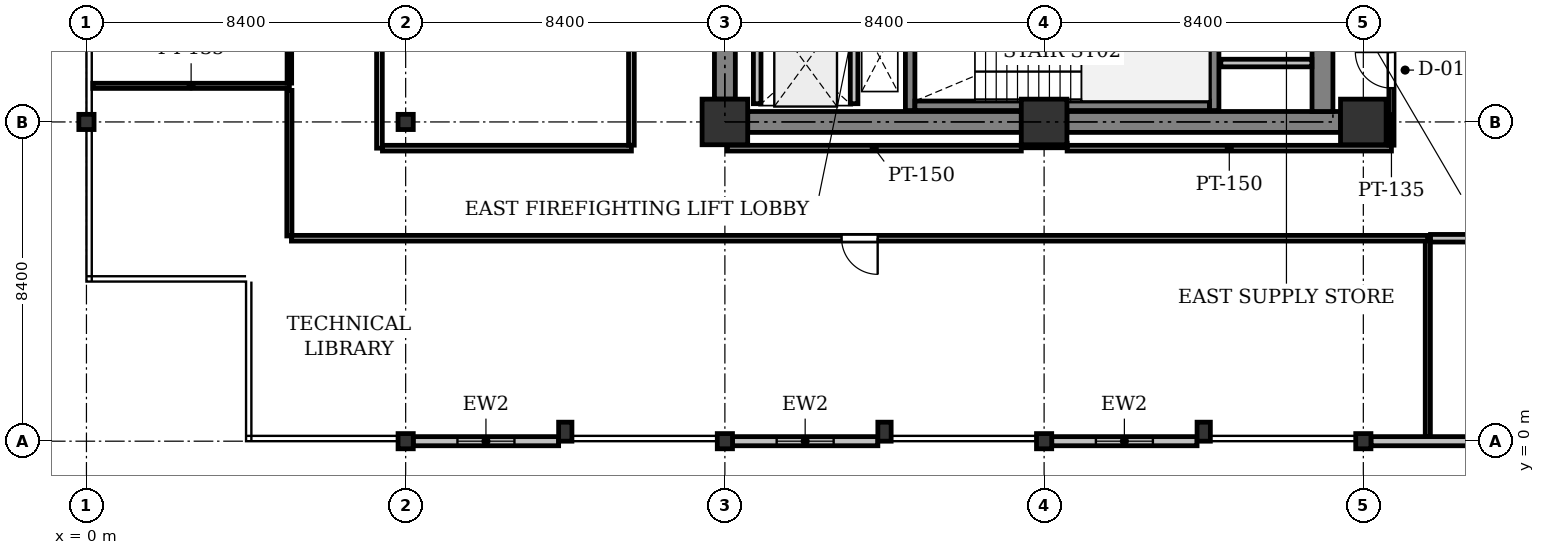
"""IFC4 building model, lengths in metres.
Left out: names, types, materials, properties, quantities, classifications, styles, units other than length and angle.
Written with IfcOpenShell. Run it as: python <this file> out.ifc"""

import sys

from ifc_helpers import new_model, si_unit, direction, frame, frame_2d, origin, origin_2d, place, context, subcontext, project, spatial, rectangle, i_section, extrude, element, fill, save


model = new_model("IFC4")
c1 = context("Model", 3, precision=1e-05, world=origin(), true_north=direction((0.0, 1.0)))
c2 = subcontext(c1, "Body", "Model", "MODEL_VIEW")
j1 = project(units=[si_unit("LENGTHUNIT", "METRE"), si_unit("PLANEANGLEUNIT", "RADIAN")], contexts=[c1])
p1 = place(None, origin())
s1 = spatial("IfcSite", under=j1, at=p1, CompositionType="ELEMENT")
p2 = place(p1, origin())
s2 = spatial("IfcBuilding", under=s1, at=p2, CompositionType="ELEMENT")
p3 = place(p2, frame((0.0, 0.0, 109.0)))
s3 = spatial("IfcBuildingStorey", under=s2, at=p3, CompositionType="ELEMENT", Elevation=109.0)
for number, where, z_axis, x_axis in (
    (1, (0.0, 8.4, 0.0), (0.0, 0.0, 1.0), (1.0, 0.0, 0.0)),
    (2, (8.4, 0.0, 0.0), (0.0, 0.0, 1.0), (1.0, 0.0, 0.0)),
    (3, (8.4, 8.4, 0.0), (0.0, 0.0, 1.0), (1.0, 0.0, 0.0)),
    (4, (16.8, 0.0, 0.0), (0.0, 0.0, 1.0), (1.0, 0.0, 0.0)),
):
    element("IfcColumn", number, at=place(p3, frame(where, z_axis=z_axis, x_axis=x_axis)), inside=s3, PredefinedType="COLUMN", context=c2, shape_type="SweptSolid", body=[
        extrude(i_section(OverallWidth=0.4, OverallDepth=0.4, WebThickness=0.025, FlangeThickness=0.04, at=origin_2d()), origin(), (0.0, 0.0, 1.0), 4.1),
    ])
p4 = place(p3, frame((16.8, 8.4, 0.0), z_axis=(0.0, 0.0, 1.0), x_axis=(1.0, 0.0, 0.0)))
e5 = element("IfcColumn", 5, at=p4, inside=s3, PredefinedType="COLUMN", context=c2, shape_type="SweptSolid", body=[
    extrude(rectangle(XDim=1.2, YDim=1.2, at=origin_2d()), origin(), (0.0, 0.0, 1.0), 4.1),
])
p5 = place(p3, frame((25.2, 0.0, 0.0), z_axis=(0.0, 0.0, 1.0), x_axis=(1.0, 0.0, 0.0)))
e6 = element("IfcColumn", 6, at=p5, inside=s3, PredefinedType="COLUMN", context=c2, shape_type="SweptSolid", body=[
    extrude(i_section(OverallWidth=0.4, OverallDepth=0.4, WebThickness=0.025, FlangeThickness=0.04, at=origin_2d()), origin(), (0.0, 0.0, 1.0), 4.1),
])
p6 = place(p3, frame((25.2, 8.4, 0.0), z_axis=(0.0, 0.0, 1.0), x_axis=(1.0, 0.0, 0.0)))
e7 = element("IfcColumn", 7, at=p6, inside=s3, PredefinedType="COLUMN", context=c2, shape_type="SweptSolid", body=[
    extrude(rectangle(XDim=1.2, YDim=1.2, at=origin_2d()), origin(), (0.0, 0.0, 1.0), 4.1),
])
p7 = place(p3, frame((33.6, 0.0, 0.0), z_axis=(0.0, 0.0, 1.0), x_axis=(1.0, 0.0, 0.0)))
e8 = element("IfcColumn", 8, at=p7, inside=s3, PredefinedType="COLUMN", context=c2, shape_type="SweptSolid", body=[
    extrude(i_section(OverallWidth=0.4, OverallDepth=0.4, WebThickness=0.025, FlangeThickness=0.04, at=origin_2d()), origin(), (0.0, 0.0, 1.0), 4.1),
])
p8 = place(p3, frame((33.6, 8.4, 0.0), z_axis=(0.0, 0.0, 1.0), x_axis=(1.0, 0.0, 0.0)))
e9 = element("IfcColumn", 9, at=p8, inside=s3, PredefinedType="COLUMN", context=c2, shape_type="SweptSolid", body=[
    extrude(rectangle(XDim=1.2, YDim=1.2, at=origin_2d()), origin(), (0.0, 0.0, 1.0), 4.1),
])
for number, where, z_axis, x_axis in (
    (10, (12.6, 0.25, 0.0), (0.0, 0.0, 1.0), (1.0, 0.0, 0.0)),
    (11, (21.0, 0.25, 0.0), (0.0, 0.0, 1.0), (1.0, 0.0, 0.0)),
    (12, (29.4, 0.25, 0.0), (0.0, 0.0, 1.0), (1.0, 0.0, 0.0)),
):
    element("IfcColumn", number, at=place(p3, frame(where, z_axis=z_axis, x_axis=x_axis)), inside=s3, PredefinedType="PILASTER", context=c2, shape_type="SweptSolid", body=[
        extrude(rectangle(XDim=0.35, YDim=0.5, at=origin_2d()), origin(), (0.0, 0.0, 1.0), 4.1),
    ])
p9 = place(p3, frame((41.8, 0.0, 0.0), z_axis=(0.0, 0.0, 1.0), x_axis=(-1.0, 0.0, 0.0)))
e13 = element("IfcWall", 13, at=p9, inside=s3, PredefinedType="STANDARD", context=c2, shape_type="SweptSolid", body=[
    extrude(rectangle(XDim=8.0, YDim=0.24, at=frame_2d((4.0, 0.0))), origin(), (0.0, 0.0, 1.0), 3.75),
])
p10 = place(p9, frame((2.537, 0.0, 0.9)))
e14 = element("IfcOpeningElement", 14, at=p10, cuts=e13, PredefinedType="OPENING", context=c2, shape_type="SweptSolid", body=[
    extrude(rectangle(XDim=1.5, YDim=1.6, at=frame_2d((0.75, 0.8))), frame((0.0, 0.13, 0.0), z_axis=(0.0, -1.0, 0.0), x_axis=(1.0, 0.0, 0.0)), (0.0, 0.0, 1.0), 0.26),
])
p11 = place(p3, frame((29.225, 0.0, 0.0), z_axis=(0.0, 0.0, 1.0), x_axis=(-1.0, 0.0, 0.0)))
e15 = element("IfcWall", 15, at=p11, inside=s3, PredefinedType="STANDARD", context=c2, shape_type="SweptSolid", body=[
    extrude(rectangle(XDim=3.825, YDim=0.24, at=frame_2d((1.913, 0.0))), origin(), (0.0, 0.0, 1.0), 3.347),
])
p12 = place(p11, frame((1.163, 0.0, 0.9)))
e16 = element("IfcOpeningElement", 16, at=p12, cuts=e15, PredefinedType="OPENING", context=c2, shape_type="SweptSolid", body=[
    extrude(rectangle(XDim=1.5, YDim=1.6, at=frame_2d((0.75, 0.8))), frame((0.0, 0.13, 0.0), z_axis=(0.0, -1.0, 0.0), x_axis=(1.0, 0.0, 0.0)), (0.0, 0.0, 1.0), 0.26),
])
p13 = place(p3, frame((20.825, 0.0, 0.0), z_axis=(0.0, 0.0, 1.0), x_axis=(-1.0, 0.0, 0.0)))
e17 = element("IfcWall", 17, at=p13, inside=s3, PredefinedType="STANDARD", context=c2, shape_type="SweptSolid", body=[
    extrude(rectangle(XDim=3.825, YDim=0.24, at=frame_2d((1.913, 0.0))), origin(), (0.0, 0.0, 1.0), 3.347),
])
p14 = place(p13, frame((1.163, 0.0, 0.9)))
e18 = element("IfcOpeningElement", 18, at=p14, cuts=e17, PredefinedType="OPENING", context=c2, shape_type="SweptSolid", body=[
    extrude(rectangle(XDim=1.5, YDim=1.6, at=frame_2d((0.75, 0.8))), frame((0.0, 0.13, 0.0), z_axis=(0.0, -1.0, 0.0), x_axis=(1.0, 0.0, 0.0)), (0.0, 0.0, 1.0), 0.26),
])
p15 = place(p3, frame((12.425, 0.0, 0.0), z_axis=(0.0, 0.0, 1.0), x_axis=(-1.0, 0.0, 0.0)))
e19 = element("IfcWall", 19, at=p15, inside=s3, PredefinedType="STANDARD", context=c2, shape_type="SweptSolid", body=[
    extrude(rectangle(XDim=3.825, YDim=0.24, at=frame_2d((1.913, 0.0))), origin(), (0.0, 0.0, 1.0), 3.347),
])
p16 = place(p15, frame((1.163, 0.0, 0.9)))
e20 = element("IfcOpeningElement", 20, at=p16, cuts=e19, PredefinedType="OPENING", context=c2, shape_type="SweptSolid", body=[
    extrude(rectangle(XDim=1.5, YDim=1.6, at=frame_2d((0.75, 0.8))), frame((0.0, 0.13, 0.0), z_axis=(0.0, -1.0, 0.0), x_axis=(1.0, 0.0, 0.0)), (0.0, 0.0, 1.0), 0.26),
])
p17 = place(p3, frame((17.4, 8.4, 0.0), z_axis=(0.0, 0.0, 1.0), x_axis=(1.0, 0.0, 0.0)))
e21 = element("IfcWall", 21, at=p17, inside=s3, PredefinedType="SHEAR", context=c2, shape_type="SweptSolid", body=[
    extrude(rectangle(XDim=7.2, YDim=0.55, at=frame_2d((3.6, 0.0))), origin(), (0.0, 0.0, 1.0), 3.75),
])
p18 = place(p3, frame((25.8, 8.4, 0.0), z_axis=(0.0, 0.0, 1.0), x_axis=(1.0, 0.0, 0.0)))
e22 = element("IfcWall", 22, at=p18, inside=s3, PredefinedType="SHEAR", context=c2, shape_type="SweptSolid", body=[
    extrude(rectangle(XDim=7.2, YDim=0.55, at=frame_2d((3.6, 0.0))), origin(), (0.0, 0.0, 1.0), 3.75),
])
p19 = place(p3, frame((32.525, 8.675, 0.0), z_axis=(0.0, 0.0, 1.0), x_axis=(0.0, 1.0, 0.0)))
e23 = element("IfcWall", 23, at=p19, inside=s3, PredefinedType="SHEAR", context=c2, shape_type="SweptSolid", body=[
    extrude(rectangle(XDim=7.85, YDim=0.55, at=frame_2d((3.925, 0.0))), origin(), (0.0, 0.0, 1.0), 3.75),
])
p20 = place(p19, frame((4.025, 0.0, 0.0)))
e24 = element("IfcOpeningElement", 24, at=p20, cuts=e23, PredefinedType="OPENING", context=c2, shape_type="SweptSolid", body=[
    extrude(rectangle(XDim=1.1, YDim=2.15, at=frame_2d((0.55, 1.075))), frame((0.0, 0.285, 0.0), z_axis=(0.0, -1.0, 0.0), x_axis=(1.0, 0.0, 0.0)), (0.0, 0.0, 1.0), 0.57),
])
p21 = place(p3, frame((16.8, 9.0, 0.0), z_axis=(0.0, 0.0, 1.0), x_axis=(0.0, 1.0, 0.0)))
e25 = element("IfcWall", 25, at=p21, inside=s3, PredefinedType="SHEAR", context=c2, shape_type="SweptSolid", body=[
    extrude(rectangle(XDim=7.2, YDim=0.55, at=frame_2d((3.6, 0.0))), origin(), (0.0, 0.0, 1.0), 3.75),
])
p22 = place(p21, frame((3.25, 0.0, 0.0)))
e26 = element("IfcOpeningElement", 26, at=p22, cuts=e25, PredefinedType="OPENING", context=c2, shape_type="SweptSolid", body=[
    extrude(rectangle(XDim=1.1, YDim=2.15, at=frame_2d((0.55, 1.075))), frame((0.0, 0.285, 0.0), z_axis=(0.0, -1.0, 0.0), x_axis=(1.0, 0.0, 0.0)), (0.0, 0.0, 1.0), 0.57),
])
for number, where, z_axis, x_axis in (
    (27, (21.675, 8.7, 0.0), (0.0, 0.0, 1.0), (0.0, 1.0, 0.0)),
    (28, (29.675, 8.7, 0.0), (0.0, 0.0, 1.0), (0.0, 1.0, 0.0)),
):
    element("IfcWall", number, at=place(p3, frame(where, z_axis=z_axis, x_axis=x_axis)), inside=s3, PredefinedType="SHEAR", context=c2, shape_type="SweptSolid", body=[
        extrude(rectangle(XDim=3.75, YDim=0.25, at=frame_2d((1.875, 0.0))), origin(), (0.0, 0.0, 1.0), 3.75),
    ])
p23 = place(p3, frame((21.8, 8.825, 0.0), z_axis=(0.0, 0.0, 1.0), x_axis=(1.0, 0.0, 0.0)))
e29 = element("IfcWall", 29, at=p23, inside=s3, PredefinedType="SHEAR", context=c2, shape_type="SweptSolid", body=[
    extrude(rectangle(XDim=7.75, YDim=0.25, at=frame_2d((3.875, 0.0))), origin(), (0.0, 0.0, 1.0), 3.75),
])
for number, where, z_axis, x_axis in (
    (30, (20.2, 8.88, 0.0), (0.0, 0.0, 1.0), (0.0, 1.0, 0.0)),
    (31, (17.65, 8.88, 0.0), (0.0, 0.0, 1.0), (0.0, 1.0, 0.0)),
):
    element("IfcWall", number, at=place(p3, frame(where, z_axis=z_axis, x_axis=x_axis)), inside=s3, PredefinedType="PARTITIONING", context=c2, shape_type="SweptSolid", body=[
        extrude(rectangle(XDim=2.1, YDim=0.2, at=frame_2d((1.05, 0.0))), origin(), (0.0, 0.0, 1.0), 3.75),
    ])
p24 = place(p3, frame((29.85, 9.95, 0.0), z_axis=(0.0, 0.0, 1.0), x_axis=(1.0, 0.0, 0.0)))
e32 = element("IfcWall", 32, at=p24, inside=s3, PredefinedType="PARTITIONING", context=c2, shape_type="SweptSolid", body=[
    extrude(rectangle(XDim=2.396, YDim=0.2, at=frame_2d((1.198, 0.0))), origin(), (0.0, 0.0, 1.0), 3.75),
])
p25 = place(p3, frame((0.169, 9.35, 0.0), z_axis=(0.0, 0.0, 1.0), x_axis=(1.0, 0.0, 0.0)))
e33 = element("IfcWall", 33, at=p25, inside=s3, PredefinedType="PARTITIONING", context=c2, shape_type="SweptSolid", body=[
    extrude(rectangle(XDim=5.171, YDim=0.135, at=frame_2d((2.585, 0.0))), origin(), (0.0, 0.0, 1.0), 3.394),
])
p26 = place(p3, frame((5.34, 9.421, 0.0), z_axis=(0.0, 0.0, 1.0), x_axis=(0.0, 1.0, 0.0)))
e34 = element("IfcWall", 34, at=p26, inside=s3, PredefinedType="PARTITIONING", context=c2, shape_type="SweptSolid", body=[
    extrude(rectangle(XDim=2.957, YDim=0.12, at=frame_2d((1.479, 0.0))), origin(), (0.0, 0.0, 1.0), 3.75),
])
p27 = place(p26, frame((1.019, 0.0, 0.0)))
e35 = element("IfcOpeningElement", 35, at=p27, cuts=e34, PredefinedType="OPENING", context=c2, shape_type="SweptSolid", body=[
    extrude(rectangle(XDim=0.92, YDim=2.1, at=frame_2d((0.46, 1.05))), frame((0.0, 0.07, 0.0), z_axis=(0.0, -1.0, 0.0), x_axis=(1.0, 0.0, 0.0)), (0.0, 0.0, 1.0), 0.14),
])
p28 = place(p3, frame((25.806, 7.781, 0.0), z_axis=(0.0, 0.0, 1.0), x_axis=(-0.999999672047, -0.000809880277, 0.0)))
e36 = element("IfcWall", 36, at=p28, inside=s3, PredefinedType="PARTITIONING", context=c2, shape_type="SweptSolid", body=[
    extrude(rectangle(XDim=1.206, YDim=0.12, at=frame_2d((0.603, 0.0))), origin(), (0.0, 0.0, 1.0), 3.222),
])
p29 = place(p3, frame((16.86, 7.71, 0.0), z_axis=(0.0, 0.0, 1.0), x_axis=(1.0, 0.0, 0.0)))
e37 = element("IfcWall", 37, at=p29, inside=s3, PredefinedType="PARTITIONING", context=c2, shape_type="SweptSolid", body=[
    extrude(rectangle(XDim=7.74, YDim=0.15, at=frame_2d((3.87, 0.0))), origin(), (0.0, 0.0, 1.0), 3.222),
])
p30 = place(p3, frame((25.806, 7.71, 0.0), z_axis=(0.0, 0.0, 1.0), x_axis=(1.0, 0.0, 0.0)))
e38 = element("IfcWall", 38, at=p30, inside=s3, PredefinedType="PARTITIONING", context=c2, shape_type="SweptSolid", body=[
    extrude(rectangle(XDim=8.534, YDim=0.15, at=frame_2d((4.267, 0.0))), origin(), (0.0, 0.0, 1.0), 3.222),
])
p31 = place(p3, frame((34.34, 7.789, 0.0), z_axis=(0.0, 0.0, 1.0), x_axis=(0.0, 1.0, 0.0)))
e39 = element("IfcWall", 39, at=p31, inside=s3, PredefinedType="PARTITIONING", context=c2, shape_type="SweptSolid", body=[
    extrude(rectangle(XDim=3.951, YDim=0.135, at=frame_2d((1.976, 0.0))), origin(), (0.0, 0.0, 1.0), 3.217),
])
p32 = place(p31, frame((1.5, 0.0, 0.0)))
e40 = element("IfcOpeningElement", 40, at=p32, cuts=e39, PredefinedType="OPENING", context=c2, shape_type="SweptSolid", body=[
    extrude(rectangle(XDim=0.95, YDim=2.15, at=frame_2d((0.475, 1.075))), frame((0.0, 0.077, 0.0), z_axis=(0.0, -1.0, 0.0), x_axis=(1.0, 0.0, 0.0)), (0.0, 0.0, 1.0), 0.155),
])
p33 = place(p3, frame((35.297, 0.124, 0.0), z_axis=(0.0, 0.0, 1.0), x_axis=(0.0, 1.0, 0.0)))
e41 = element("IfcWall", 41, at=p33, inside=s3, PredefinedType="PARTITIONING", context=c2, shape_type="SweptSolid", body=[
    extrude(rectangle(XDim=5.216, YDim=0.135, at=frame_2d((2.608, 0.0))), origin(), (0.0, 0.0, 1.0), 3.75),
])
p34 = place(p3, frame((35.297, 5.34, 0.0), z_axis=(0.0, 0.0, 1.0), x_axis=(-0.999999999967, 8.164398e-06, 0.0)))
e42 = element("IfcWall", 42, at=p34, inside=s3, PredefinedType="PARTITIONING", context=c2, shape_type="SweptSolid", body=[
    extrude(rectangle(XDim=29.903, YDim=0.15, at=frame_2d((14.952, 0.0))), origin(), (0.0, 0.0, 1.0), 3.222),
])
p35 = place(p34, frame((14.477, 0.0, 0.0)))
e43 = element("IfcOpeningElement", 43, at=p35, cuts=e42, PredefinedType="OPENING", context=c2, shape_type="SweptSolid", body=[
    extrude(rectangle(XDim=0.95, YDim=2.15, at=frame_2d((0.475, 1.075))), frame((0.0, 0.085, 0.0), z_axis=(0.0, -1.0, 0.0), x_axis=(1.0, 0.0, 0.0)), (0.0, 0.0, 1.0), 0.17),
])
p36 = place(p3, frame((5.34, 5.4, 0.0), z_axis=(0.0, 0.0, 1.0), x_axis=(0.0, 1.0, 0.0)))
e44 = element("IfcWall", 44, at=p36, inside=s3, PredefinedType="PARTITIONING", context=c2, shape_type="SweptSolid", body=[
    extrude(rectangle(XDim=3.83, YDim=0.135, at=frame_2d((1.915, 0.0))), origin(), (0.0, 0.0, 1.0), 3.217),
])
p37 = place(p3, frame((7.71, 22.711, 0.0), z_axis=(0.0, 0.0, 1.0), x_axis=(0.0, -1.0, 0.0)))
e45 = element("IfcWall", 45, at=p37, inside=s3, PredefinedType="PARTITIONING", context=c2, shape_type="SweptSolid", body=[
    extrude(rectangle(XDim=15.001, YDim=0.15, at=frame_2d((7.5, 0.0))), origin(), (0.0, 0.0, 1.0), 3.217),
])
p38 = place(p3, frame((7.789, 7.71, 0.0), z_axis=(0.0, 0.0, 1.0), x_axis=(1.0, 0.0, 0.0)))
e46 = element("IfcWall", 46, at=p38, inside=s3, PredefinedType="PARTITIONING", context=c2, shape_type="SweptSolid", body=[
    extrude(rectangle(XDim=6.551, YDim=0.15, at=frame_2d((3.275, 0.0))), origin(), (0.0, 0.0, 1.0), 3.222),
])
p39 = place(p3, frame((14.34, 7.789, 0.0), z_axis=(0.0, 0.0, 1.0), x_axis=(0.0, 1.0, 0.0)))
e47 = element("IfcWall", 47, at=p39, inside=s3, PredefinedType="PARTITIONING", context=c2, shape_type="SweptSolid", body=[
    extrude(rectangle(XDim=6.411, YDim=0.15, at=frame_2d((3.206, 0.0))), origin(), (0.0, 0.0, 1.0), 3.217),
])
p40 = place(p3, frame((41.2, 5.34, 0.0), z_axis=(0.0, 0.0, 1.0), x_axis=(-1.0, 0.0, 0.0)))
e48 = element("IfcWall", 48, at=p40, inside=s3, PredefinedType="PARTITIONING", context=c2, shape_type="SweptSolid", body=[
    extrude(rectangle(XDim=5.832, YDim=0.2, at=frame_2d((2.916, 0.0))), origin(), (0.0, 0.0, 1.0), 3.75),
])
p41 = place(p12, origin())
e49 = element("IfcWindow", 49, at=p41, inside=s3, PartitioningType="SINGLE_PANEL", PredefinedType="WINDOW", context=c2, shape_type="SweptSolid", body=[
    extrude(rectangle(XDim=1.5, YDim=1.6, at=frame_2d((0.75, 0.8))), frame((0.0, 0.03, 0.0), z_axis=(0.0, -1.0, 0.0), x_axis=(1.0, 0.0, 0.0)), (0.0, 0.0, 1.0), 0.06),
])
fill(e16, e49)
p42 = place(p14, origin())
e50 = element("IfcWindow", 50, at=p42, inside=s3, PartitioningType="SINGLE_PANEL", PredefinedType="WINDOW", context=c2, shape_type="SweptSolid", body=[
    extrude(rectangle(XDim=1.5, YDim=1.6, at=frame_2d((0.75, 0.8))), frame((0.0, 0.03, 0.0), z_axis=(0.0, -1.0, 0.0), x_axis=(1.0, 0.0, 0.0)), (0.0, 0.0, 1.0), 0.06),
])
fill(e18, e50)
p43 = place(p16, origin())
e51 = element("IfcWindow", 51, at=p43, inside=s3, PartitioningType="SINGLE_PANEL", PredefinedType="WINDOW", context=c2, shape_type="SweptSolid", body=[
    extrude(rectangle(XDim=1.5, YDim=1.6, at=frame_2d((0.75, 0.8))), frame((0.0, 0.03, 0.0), z_axis=(0.0, -1.0, 0.0), x_axis=(1.0, 0.0, 0.0)), (0.0, 0.0, 1.0), 0.06),
])
fill(e20, e51)
p44 = place(p32, origin())
e52 = element("IfcDoor", 52, at=p44, inside=s3, OperationType="SINGLE_SWING_RIGHT", PredefinedType="DOOR", context=c2, shape_type="SweptSolid", body=[
    extrude(rectangle(XDim=0.95, YDim=2.15, at=frame_2d((0.475, 1.075))), frame((0.0, 0.025, 0.0), z_axis=(0.0, -1.0, 0.0), x_axis=(1.0, 0.0, 0.0)), (0.0, 0.0, 1.0), 0.05),
])
fill(e40, e52)
p45 = place(p35, origin())
e53 = element("IfcDoor", 53, at=p45, inside=s3, OperationType="SINGLE_SWING_LEFT", PredefinedType="DOOR", context=c2, shape_type="SweptSolid", body=[
    extrude(rectangle(XDim=0.95, YDim=2.15, at=frame_2d((0.475, 1.075))), frame((0.0, 0.025, 0.0), z_axis=(0.0, -1.0, 0.0), x_axis=(1.0, 0.0, 0.0)), (0.0, 0.0, 1.0), 0.05),
])
fill(e43, e53)
save(model, sys.argv[1])
